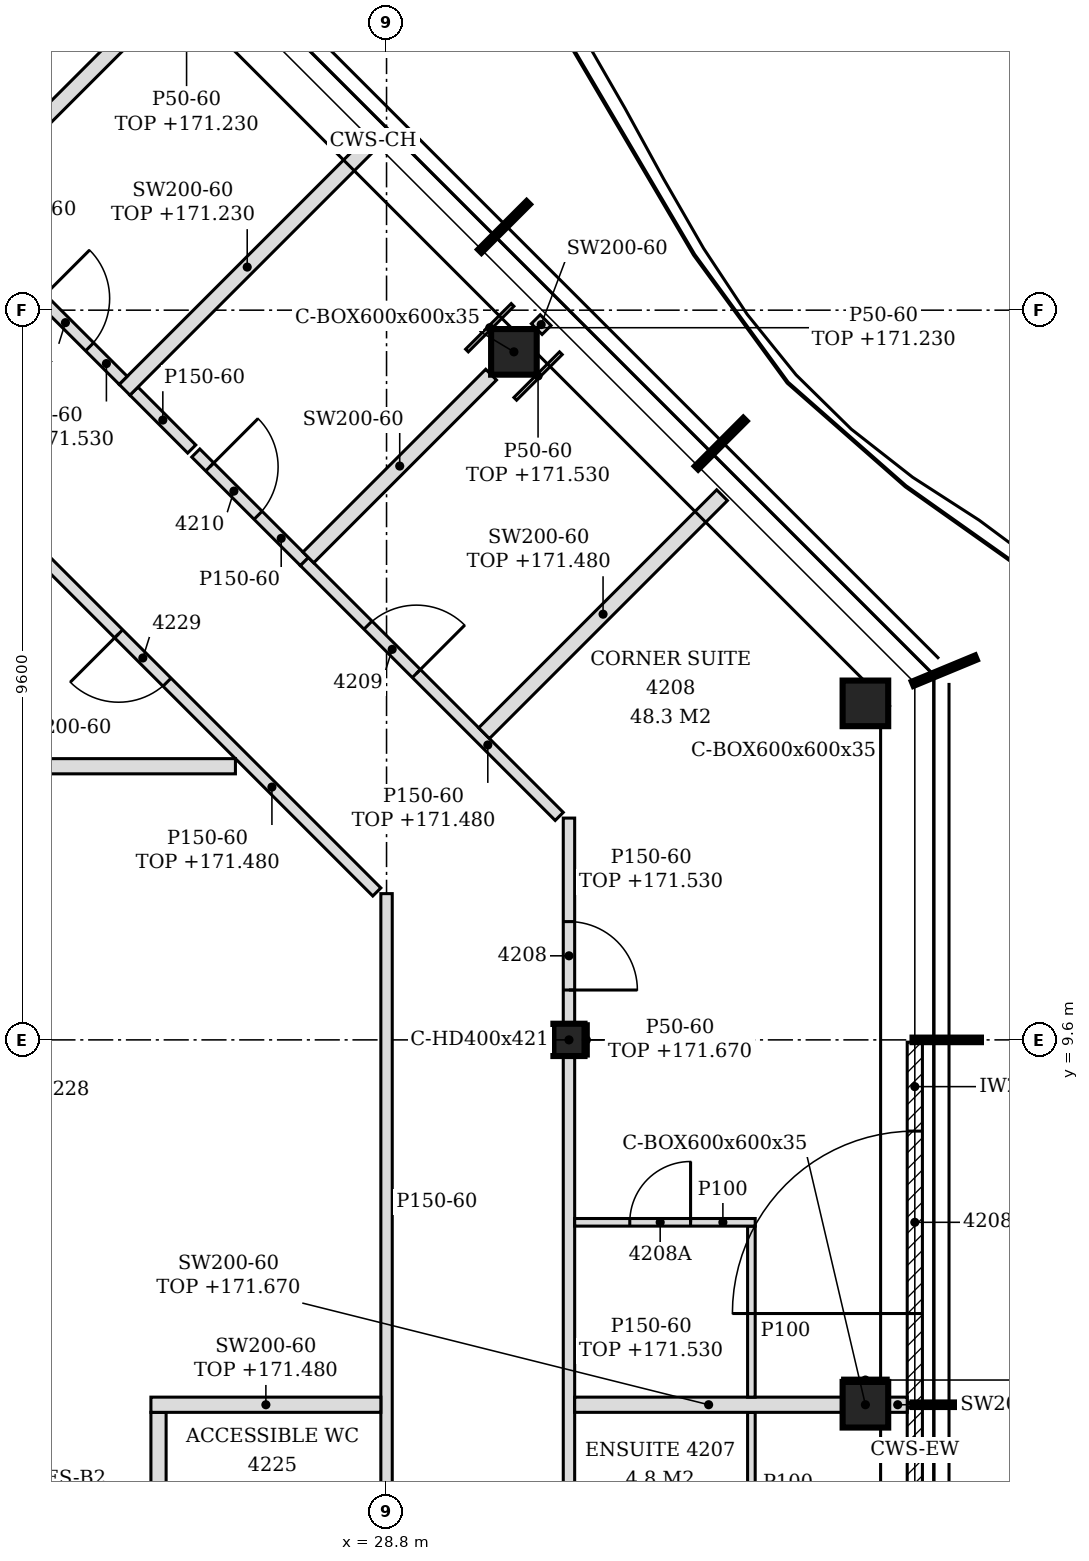
"""IFC4 building model, lengths in metres.
Left out: names, types, materials, properties, quantities, classifications, styles, units other than length and angle.
Written with IfcOpenShell. Run it as: python <this file> out.ifc"""

import sys

from ifc_helpers import new_model, si_unit, direction, frame, frame_2d, origin, origin_2d, place, context, subcontext, project, spatial, polyline, rectangle, hollow_rectangle, i_section, outline, extrude, clip, halfspace, element, fill, save


model = new_model("IFC4")
c1 = context("Model", 3, precision=1e-05, world=origin(), true_north=direction((0.0, 1.0)))
c2 = subcontext(c1, "Body", "Model", "MODEL_VIEW")
j1 = project(units=[si_unit("LENGTHUNIT", "METRE"), si_unit("PLANEANGLEUNIT", "RADIAN")], contexts=[c1])
p1 = place(None, origin())
s1 = spatial("IfcSite", under=j1, at=p1, CompositionType="ELEMENT")
p2 = place(p1, origin())
s2 = spatial("IfcBuilding", under=s1, at=p2, CompositionType="ELEMENT")
p3 = place(p2, frame((0.0, 0.0, 168.6)))
s3 = spatial("IfcBuildingStorey", under=s2, at=p3, CompositionType="ELEMENT", Elevation=168.6)
for number, where, z_axis, x_axis in (
    (1, (35.1, 4.8, -0.15), (0.0, 0.0, 1.0), (1.0, 0.0, 0.0)),
    (2, (35.1, 14.027, -0.15), (0.0, 0.0, 1.0), (1.0, 0.0, 0.0)),
    (3, (30.476, 18.652, -0.15), (0.0, 0.0, 1.0), (1.0, 0.0, 0.0)),
):
    element("IfcColumn", number, at=place(p3, frame(where, z_axis=z_axis, x_axis=x_axis)), inside=s3, PredefinedType="COLUMN", context=c2, shape_type="Clipping", body=[
        clip(extrude(hollow_rectangle(XDim=0.6, YDim=0.6, WallThickness=0.035, at=origin_2d()), origin(), (0.0, 0.0, 1.0), 3.6), halfspace(frame((0.0, 0.0, 3.589), z_axis=(0.0, 0.0, 1.0), x_axis=(1.0, 0.0, 0.0)), False)),
    ])
p4 = place(p3, frame((31.2, 9.6, -0.15), z_axis=(0.0, 0.0, 1.0), x_axis=(1.0, 0.0, 0.0)))
e4 = element("IfcColumn", 4, at=p4, inside=s3, PredefinedType="COLUMN", context=c2, shape_type="SweptSolid", body=[
    extrude(i_section(OverallWidth=0.409, OverallDepth=0.425, WebThickness=0.033, FlangeThickness=0.052, FilletRadius=0.015, at=origin_2d()), origin(), (0.0, 0.0, 1.0), 3.6),
])
p5 = place(p3, frame((35.75, 0.03, 0.0), z_axis=(0.0, 0.0, 1.0), x_axis=(0.0, 1.0, 0.0)))
e5 = element("IfcWall", 5, at=p5, inside=s3, PredefinedType="NOTDEFINED", context=c2, shape_type="SweptSolid", body=[
    extrude(rectangle(XDim=4.74, YDim=0.2, at=frame_2d((2.37, 0.0))), origin(), (0.0, 0.0, 1.0), 3.45),
])
p6 = place(p5, frame((1.17, 0.0, 0.0)))
e6 = element("IfcOpeningElement", 6, at=p6, cuts=e5, PredefinedType="OPENING", context=c2, shape_type="SweptSolid", body=[
    extrude(rectangle(XDim=2.4, YDim=2.4, at=frame_2d((1.2, 1.2))), frame((0.0, 0.11, 0.0), z_axis=(0.0, -1.0, 0.0), x_axis=(1.0, 0.0, 0.0)), (0.0, 0.0, 1.0), 0.22),
])
p7 = place(p3, frame((35.75, 4.83, 0.0), z_axis=(0.0, 0.0, 1.0), x_axis=(0.0, 1.0, 0.0)))
e7 = element("IfcWall", 7, at=p7, inside=s3, PredefinedType="NOTDEFINED", context=c2, shape_type="SweptSolid", body=[
    extrude(rectangle(XDim=4.74, YDim=0.2, at=frame_2d((2.37, 0.0))), origin(), (0.0, 0.0, 1.0), 3.45),
])
p8 = place(p7, frame((1.17, 0.0, 0.0)))
e8 = element("IfcOpeningElement", 8, at=p8, cuts=e7, PredefinedType="OPENING", context=c2, shape_type="SweptSolid", body=[
    extrude(rectangle(XDim=2.4, YDim=2.4, at=frame_2d((1.2, 1.2))), frame((0.0, 0.11, 0.0), z_axis=(0.0, -1.0, 0.0), x_axis=(1.0, 0.0, 0.0)), (0.0, 0.0, 1.0), 0.22),
])
p9 = place(p3, frame((31.2, 0.387, 0.0), z_axis=(0.0, 0.0, 1.0), x_axis=(0.0, 1.0, 0.0)))
e9 = element("IfcWall", 9, at=p9, inside=s3, PredefinedType="PARTITIONING", context=c2, shape_type="SweptSolid", body=[
    extrude(rectangle(XDim=9.0, YDim=0.15, at=frame_2d((4.5, 0.0))), origin(), (0.0, 0.0, 1.0), 2.93),
])
p10 = place(p9, frame((0.666, 0.0, 0.0)))
e10 = element("IfcOpeningElement", 10, at=p10, cuts=e9, PredefinedType="OPENING", context=c2, shape_type="SweptSolid", body=[
    extrude(rectangle(XDim=0.9, YDim=2.1, at=frame_2d((0.45, 1.05))), frame((0.0, 0.085, 0.0), z_axis=(0.0, -1.0, 0.0), x_axis=(1.0, 0.0, 0.0)), (0.0, 0.0, 1.0), 0.17),
])
p11 = place(p3, frame((25.8, 1.3, 0.0), z_axis=(0.0, 0.0, 1.0), x_axis=(0.0, 1.0, 0.0)))
e11 = element("IfcWall", 11, at=p11, inside=s3, PredefinedType="PARTITIONING", context=c2, shape_type="SweptSolid", body=[
    extrude(outline(polyline([(0.0, 0.0), (3.4, 0.0), (3.4, 2.88), (3.395, 2.88), (3.393, 3.45), (0.0, 3.45), (0.0, 0.0)])), frame((0.0, 0.1, 0.0), z_axis=(0.0, -1.0, 0.0), x_axis=(1.0, 0.0, 0.0)), (0.0, 0.0, 1.0), 0.2),
])
p12 = place(p3, frame((28.8, 1.3, 0.0), z_axis=(0.0, 0.0, 1.0), x_axis=(0.0, 1.0, 0.0)))
e12 = element("IfcWall", 12, at=p12, inside=s3, PredefinedType="PARTITIONING", context=c2, shape_type="SweptSolid", body=[
    extrude(outline(polyline([(0.0, 0.0), (10.224, 0.0), (10.224, 3.45), (8.405, 3.45), (8.403, 2.88), (8.195, 2.88), (8.193, 3.45), (3.605, 3.45), (3.603, 2.88), (3.395, 2.88), (3.393, 3.45), (0.0, 3.45), (0.0, 0.0)])), frame((0.0, 0.075, 0.0), z_axis=(0.0, -1.0, 0.0), x_axis=(1.0, 0.0, 0.0)), (0.0, 0.0, 1.0), 0.15),
])
p13 = place(p12, frame((1.3, 0.0, 0.0)))
e13 = element("IfcOpeningElement", 13, at=p13, cuts=e12, PredefinedType="OPENING", context=c2, shape_type="SweptSolid", body=[
    extrude(rectangle(XDim=0.8, YDim=2.1, at=frame_2d((0.4, 1.05))), frame((0.0, 0.085, 0.0), z_axis=(0.0, -1.0, 0.0), x_axis=(1.0, 0.0, 0.0)), (0.0, 0.0, 1.0), 0.17),
])
p14 = place(p3, frame((33.6, 2.85, 0.0), z_axis=(0.0, 0.0, 1.0), x_axis=(0.0, 1.0, 0.0)))
e14 = element("IfcWall", 14, at=p14, inside=s3, PredefinedType="PARTITIONING", context=c2, shape_type="SweptSolid", body=[
    extrude(rectangle(XDim=1.85, YDim=0.1, at=frame_2d((0.925, 0.0))), origin(), (0.0, 0.0, 1.0), 3.45),
])
p15 = place(p3, frame((25.7, 4.8, 0.0), z_axis=(0.0, 0.0, 1.0), x_axis=(1.0, 0.0, 0.0)))
e15 = element("IfcWall", 15, at=p15, inside=s3, PredefinedType="PARTITIONING", context=c2, shape_type="SweptSolid", body=[
    extrude(rectangle(XDim=3.025, YDim=0.2, at=frame_2d((1.513, 0.0))), origin(), (0.0, 0.0, 1.0), 2.88),
])
p16 = place(p3, frame((31.275, 4.8, 0.0), z_axis=(0.0, 0.0, 1.0), x_axis=(1.0, 0.0, 0.0)))
e16 = element("IfcWall", 16, at=p16, inside=s3, PredefinedType="PARTITIONING", context=c2, shape_type="SweptSolid", body=[
    extrude(outline(polyline([(0.0, 0.0), (3.525, 0.0), (3.525, 3.07), (0.075, 3.07), (0.073, 2.93), (0.0, 2.93), (0.0, 0.0)])), frame((0.0, 0.1, 0.0), z_axis=(0.0, -1.0, 0.0), x_axis=(1.0, 0.0, 0.0)), (0.0, 0.0, 1.0), 0.2),
])
p17 = place(p3, frame((35.4, 4.8, 0.0), z_axis=(0.0, 0.0, 1.0), x_axis=(1.0, 0.0, 0.0)))
e17 = element("IfcWall", 17, at=p17, inside=s3, PredefinedType="PARTITIONING", context=c2, shape_type="SweptSolid", body=[
    extrude(rectangle(XDim=0.25, YDim=0.2, at=frame_2d((0.125, 0.0))), origin(), (0.0, 0.0, 1.0), 3.45),
])
p18 = place(p3, frame((33.6, 4.9, 0.0), z_axis=(0.0, 0.0, 1.0), x_axis=(0.0, 1.0, 0.0)))
e18 = element("IfcWall", 18, at=p18, inside=s3, PredefinedType="PARTITIONING", context=c2, shape_type="SweptSolid", body=[
    extrude(rectangle(XDim=2.25, YDim=0.1, at=frame_2d((1.125, 0.0))), origin(), (0.0, 0.0, 1.0), 3.45),
])
p19 = place(p3, frame((31.275, 7.2, 0.0), z_axis=(0.0, 0.0, 1.0), x_axis=(1.0, 0.0, 0.0)))
e19 = element("IfcWall", 19, at=p19, inside=s3, PredefinedType="PARTITIONING", context=c2, shape_type="SweptSolid", body=[
    extrude(outline(polyline([(0.0, 0.0), (2.375, 0.0), (2.375, 3.45), (0.075, 3.45), (0.073, 2.93), (0.0, 2.93), (0.0, 0.0)])), frame((0.0, 0.05, 0.0), z_axis=(0.0, -1.0, 0.0), x_axis=(1.0, 0.0, 0.0)), (0.0, 0.0, 1.0), 0.1),
])
p20 = place(p19, frame((0.725, 0.0, 0.0)))
e20 = element("IfcOpeningElement", 20, at=p20, cuts=e19, PredefinedType="OPENING", context=c2, shape_type="SweptSolid", body=[
    extrude(rectangle(XDim=0.8, YDim=2.1, at=frame_2d((0.4, 1.05))), frame((0.0, 0.06, 0.0), z_axis=(0.0, -1.0, 0.0), x_axis=(1.0, 0.0, 0.0)), (0.0, 0.0, 1.0), 0.12),
])
p21 = place(p3, frame((31.2, 9.812, 0.0), z_axis=(0.0, 0.0, 1.0), x_axis=(0.0, 1.0, 0.0)))
e21 = element("IfcWall", 21, at=p21, inside=s3, PredefinedType="PARTITIONING", context=c2, shape_type="SweptSolid", body=[
    extrude(rectangle(XDim=2.706, YDim=0.15, at=frame_2d((1.353, 0.0))), origin(), (0.0, 0.0, 1.0), 2.93),
])
p22 = place(p21, frame((0.444, 0.0, 0.0)))
e22 = element("IfcOpeningElement", 22, at=p22, cuts=e21, PredefinedType="OPENING", context=c2, shape_type="SweptSolid", body=[
    extrude(rectangle(XDim=0.9, YDim=2.1, at=frame_2d((0.45, 1.05))), frame((0.0, 0.085, 0.0), z_axis=(0.0, -1.0, 0.0), x_axis=(1.0, 0.0, 0.0)), (0.0, 0.0, 1.0), 0.17),
])
p23 = place(p3, frame((28.672, 11.546, 0.0), z_axis=(0.0, 0.0, 1.0), x_axis=(-0.707106781187, 0.707106781187, 0.0)))
e23 = element("IfcWall", 23, at=p23, inside=s3, PredefinedType="PARTITIONING", context=c2, shape_type="SweptSolid", body=[
    extrude(rectangle(XDim=6.292, YDim=0.15, at=frame_2d((3.146, 0.0))), origin(), (0.0, 0.0, 1.0), 2.88),
])
p24 = place(p23, frame((3.903, 0.0, 0.0)))
e24 = element("IfcOpeningElement", 24, at=p24, cuts=e23, PredefinedType="OPENING", context=c2, shape_type="SweptSolid", body=[
    extrude(rectangle(XDim=0.9, YDim=2.1, at=frame_2d((0.45, 1.05))), frame((0.0, 0.085, 0.0), z_axis=(0.0, -1.0, 0.0), x_axis=(1.0, 0.0, 0.0)), (0.0, 0.0, 1.0), 0.17),
])
p25 = place(p3, frame((31.072, 12.54, 0.0), z_axis=(0.0, 0.0, 1.0), x_axis=(-0.707106781187, 0.707106781187, 0.0)))
e25 = element("IfcWall", 25, at=p25, inside=s3, PredefinedType="PARTITIONING", context=c2, shape_type="SweptSolid", body=[
    extrude(rectangle(XDim=4.743, YDim=0.15, at=frame_2d((2.372, 0.0))), origin(), (0.0, 0.0, 1.0), 2.88),
])
p26 = place(p25, frame((2.658, 0.0, 0.0)))
e26 = element("IfcOpeningElement", 26, at=p26, cuts=e25, PredefinedType="OPENING", context=c2, shape_type="SweptSolid", body=[
    extrude(rectangle(XDim=0.9, YDim=2.1, at=frame_2d((0.45, 1.05))), frame((0.0, 0.085, 0.0), z_axis=(0.0, -1.0, 0.0), x_axis=(1.0, 0.0, 0.0)), (0.0, 0.0, 1.0), 0.17),
])
p27 = place(p3, frame((21.205, 13.2, 0.0), z_axis=(0.0, 0.0, 1.0), x_axis=(1.0, 0.0, 0.0)))
e27 = element("IfcWall", 27, at=p27, inside=s3, PredefinedType="PARTITIONING", context=c2, shape_type="SweptSolid", body=[
    extrude(rectangle(XDim=5.607, YDim=0.2, at=frame_2d((2.804, 0.0))), origin(), (0.0, 0.0, 1.0), 3.45),
])
p28 = place(p3, frame((30.083, 13.635, 0.0), z_axis=(0.0, 0.0, 1.0), x_axis=(0.707106781187, 0.707106781187, 0.0)))
e28 = element("IfcWall", 28, at=p28, inside=s3, PredefinedType="PARTITIONING", context=c2, shape_type="SweptSolid", body=[
    extrude(rectangle(XDim=4.428, YDim=0.2, at=frame_2d((2.214, 0.0))), origin(), (0.0, 0.0, 1.0), 2.88),
])
p29 = place(p3, frame((27.718, 15.894, 0.0), z_axis=(0.0, 0.0, 1.0), x_axis=(-0.707348651109, 0.706864828503, 0.0)))
e29 = element("IfcWall", 29, at=p29, inside=s3, PredefinedType="PARTITIONING", context=c2, shape_type="SweptSolid", body=[
    extrude(rectangle(XDim=2.018, YDim=0.15, at=frame_2d((1.009, 0.0))), origin(), (0.0, 0.0, 1.0), 3.45),
])
p30 = place(p29, frame((0.859, 0.0, 0.0)))
e30 = element("IfcOpeningElement", 30, at=p30, cuts=e29, PredefinedType="OPENING", context=c2, shape_type="SweptSolid", body=[
    extrude(rectangle(XDim=0.9, YDim=2.1, at=frame_2d((0.45, 1.05))), frame((0.0, 0.085, 0.0), z_axis=(0.0, -1.0, 0.0), x_axis=(1.0, 0.0, 0.0)), (0.0, 0.0, 1.0), 0.17),
])
p31 = place(p3, frame((27.771, 15.947, 0.0), z_axis=(0.0, 0.0, 1.0), x_axis=(0.707106781187, 0.707106781187, 0.0)))
e31 = element("IfcWall", 31, at=p31, inside=s3, PredefinedType="PARTITIONING", context=c2, shape_type="SweptSolid", body=[
    extrude(rectangle(XDim=3.401, YDim=0.2, at=frame_2d((1.7, 0.0))), origin(), (0.0, 0.0, 1.0), 3.45),
])
p32 = place(p3, frame((26.237, 17.373, 0.0), z_axis=(0.0, 0.0, 1.0), x_axis=(-0.706198780021, 0.708013617875, 0.0)))
e32 = element("IfcWall", 32, at=p32, inside=s3, PredefinedType="PARTITIONING", context=c2, shape_type="SweptSolid", body=[
    extrude(rectangle(XDim=1.076, YDim=0.15, at=frame_2d((0.538, 0.0))), origin(), (0.0, 0.0, 1.0), 3.45),
])
p33 = place(p3, frame((25.353, 18.153, 0.0), z_axis=(0.0, 0.0, 1.0), x_axis=(0.707106781187, 0.707106781187, 0.0)))
e33 = element("IfcWall", 33, at=p33, inside=s3, PredefinedType="PARTITIONING", context=c2, shape_type="SweptSolid", body=[
    extrude(rectangle(XDim=4.565, YDim=0.2, at=frame_2d((2.282, 0.0))), origin(), (0.0, 0.0, 1.0), 2.63),
])
p34 = place(p3, frame((25.335, 18.277, 0.0), z_axis=(0.0, 0.0, 1.0), x_axis=(-0.707254881879, 0.706958649468, 0.0)))
e34 = element("IfcWall", 34, at=p34, inside=s3, PredefinedType="PARTITIONING", context=c2, shape_type="SweptSolid", body=[
    extrude(rectangle(XDim=1.648, YDim=0.15, at=frame_2d((0.824, 0.0))), origin(), (0.0, 0.0, 1.0), 2.93),
])
p35 = place(p34, frame((0.624, 0.0, 0.0)))
e35 = element("IfcOpeningElement", 35, at=p35, cuts=e34, PredefinedType="OPENING", context=c2, shape_type="SweptSolid", body=[
    extrude(rectangle(XDim=0.9, YDim=2.1, at=frame_2d((0.45, 1.05))), frame((0.0, 0.085, 0.0), z_axis=(0.0, -1.0, 0.0), x_axis=(1.0, 0.0, 0.0)), (0.0, 0.0, 1.0), 0.17),
])
p36 = place(p3, frame((30.776, 18.952, 0.0), z_axis=(0.0, 0.0, 1.0), x_axis=(0.707106781187, 0.707106781187, 0.0)))
e36 = element("IfcWall", 36, at=p36, inside=s3, PredefinedType="PARTITIONING", context=c2, shape_type="SweptSolid", body=[
    extrude(rectangle(XDim=0.166, YDim=0.2, at=frame_2d((0.083, 0.0))), origin(), (0.0, 0.0, 1.0), 3.45),
])
p37 = place(p3, frame((23.041, 20.465, 0.0), z_axis=(0.0, 0.0, 1.0), x_axis=(0.707106781187, 0.707106781187, 0.0)))
e37 = element("IfcWall", 37, at=p37, inside=s3, PredefinedType="PARTITIONING", context=c2, shape_type="SweptSolid", body=[
    extrude(rectangle(XDim=3.55, YDim=0.2, at=frame_2d((1.775, 0.0))), origin(), (0.0, 0.0, 1.0), 3.45),
])
p38 = place(p3, frame((31.429, 9.387, 0.0), z_axis=(0.0, 0.0, 1.0), x_axis=(0.0, 1.0, 0.0)))
e38 = element("IfcWall", 38, at=p38, inside=s3, PredefinedType="PARTITIONING", context=c2, shape_type="SweptSolid", body=[
    extrude(rectangle(XDim=0.425, YDim=0.05, at=frame_2d((0.212, 0.0))), origin(), (0.0, 0.0, 1.0), 3.07),
])
p39 = place(p3, frame((34.8, 5.125, 0.0), z_axis=(0.0, 0.0, 1.0), x_axis=(1.0, 0.0, 0.0)))
e39 = element("IfcWall", 39, at=p39, inside=s3, PredefinedType="PARTITIONING", context=c2, shape_type="SweptSolid", body=[
    extrude(rectangle(XDim=0.6, YDim=0.05, at=frame_2d((0.3, 0.0))), origin(), (0.0, 0.0, 1.0), 2.93),
])
p40 = place(p3, frame((29.858, 18.669, 0.0), z_axis=(0.0, 0.0, 1.0), x_axis=(0.707106781187, 0.707106781187, 0.0)))
e40 = element("IfcWall", 40, at=p40, inside=s3, PredefinedType="PARTITIONING", context=c2, shape_type="SweptSolid", body=[
    extrude(rectangle(XDim=0.849, YDim=0.05, at=frame_2d((0.424, 0.0))), origin(), (0.0, 0.0, 1.0), 2.63),
])
p41 = place(p3, frame((30.493, 18.034, 0.0), z_axis=(0.0, 0.0, 1.0), x_axis=(0.707106781187, 0.707106781187, 0.0)))
e41 = element("IfcWall", 41, at=p41, inside=s3, PredefinedType="PARTITIONING", context=c2, shape_type="SweptSolid", body=[
    extrude(rectangle(XDim=0.849, YDim=0.05, at=frame_2d((0.424, 0.0))), origin(), (0.0, 0.0, 1.0), 2.93),
])
p42 = place(p8, origin())
e42 = element("IfcDoor", 42, at=p42, inside=s3, OperationType="SINGLE_SWING_LEFT", PredefinedType="DOOR", context=c2, shape_type="SweptSolid", body=[
    extrude(rectangle(XDim=2.4, YDim=2.4, at=frame_2d((1.2, 1.2))), frame((0.0, 0.025, 0.0), z_axis=(0.0, -1.0, 0.0), x_axis=(1.0, 0.0, 0.0)), (0.0, 0.0, 1.0), 0.05),
])
fill(e8, e42)
p43 = place(p22, frame((0.9, 0.0, 0.0), z_axis=(0.0, 0.0, 1.0), x_axis=(-1.0, 0.0, 0.0)))
e43 = element("IfcDoor", 43, at=p43, inside=s3, OperationType="SINGLE_SWING_RIGHT", PredefinedType="DOOR", context=c2, shape_type="SweptSolid", body=[
    extrude(rectangle(XDim=0.9, YDim=2.1, at=frame_2d((0.45, 1.05))), frame((0.0, 0.025, 0.0), z_axis=(0.0, -1.0, 0.0), x_axis=(1.0, 0.0, 0.0)), (0.0, 0.0, 1.0), 0.05),
])
fill(e22, e43)
p44 = place(p20, origin())
e44 = element("IfcDoor", 44, at=p44, inside=s3, OperationType="SINGLE_SWING_RIGHT", PredefinedType="DOOR", context=c2, shape_type="SweptSolid", body=[
    extrude(rectangle(XDim=0.8, YDim=2.1, at=frame_2d((0.4, 1.05))), frame((0.0, 0.025, 0.0), z_axis=(0.0, -1.0, 0.0), x_axis=(1.0, 0.0, 0.0)), (0.0, 0.0, 1.0), 0.05),
])
fill(e20, e44)
p45 = place(p26, frame((0.9, 0.0, 0.0), z_axis=(0.0, 0.0, 1.0), x_axis=(-1.0, 0.0, 0.0)))
e45 = element("IfcDoor", 45, at=p45, inside=s3, OperationType="SINGLE_SWING_RIGHT", PredefinedType="DOOR", context=c2, shape_type="SweptSolid", body=[
    extrude(rectangle(XDim=0.9, YDim=2.1, at=frame_2d((0.45, 1.05))), frame((0.0, 0.025, 0.0), z_axis=(0.0, -1.0, 0.0), x_axis=(1.0, 0.0, 0.0)), (0.0, 0.0, 1.0), 0.05),
])
fill(e26, e45)
p46 = place(p30, frame((0.9, 0.0, 0.0), z_axis=(0.0, 0.0, 1.0), x_axis=(-1.0, 0.0, 0.0)))
e46 = element("IfcDoor", 46, at=p46, inside=s3, OperationType="SINGLE_SWING_LEFT", PredefinedType="DOOR", context=c2, shape_type="SweptSolid", body=[
    extrude(rectangle(XDim=0.9, YDim=2.1, at=frame_2d((0.45, 1.05))), frame((0.0, 0.025, 0.0), z_axis=(0.0, -1.0, 0.0), x_axis=(1.0, 0.0, 0.0)), (0.0, 0.0, 1.0), 0.05),
])
fill(e30, e46)
p47 = place(p35, frame((0.9, 0.0, 0.0), z_axis=(0.0, 0.0, 1.0), x_axis=(-1.0, 0.0, 0.0)))
e47 = element("IfcDoor", 47, at=p47, inside=s3, OperationType="SINGLE_SWING_LEFT", PredefinedType="DOOR", context=c2, shape_type="SweptSolid", body=[
    extrude(rectangle(XDim=0.9, YDim=2.1, at=frame_2d((0.45, 1.05))), frame((0.0, 0.025, 0.0), z_axis=(0.0, -1.0, 0.0), x_axis=(1.0, 0.0, 0.0)), (0.0, 0.0, 1.0), 0.05),
])
fill(e35, e47)
p48 = place(p24, origin())
e48 = element("IfcDoor", 48, at=p48, inside=s3, OperationType="SINGLE_SWING_RIGHT", PredefinedType="DOOR", context=c2, shape_type="SweptSolid", body=[
    extrude(rectangle(XDim=0.9, YDim=2.1, at=frame_2d((0.45, 1.05))), frame((0.0, 0.025, 0.0), z_axis=(0.0, -1.0, 0.0), x_axis=(1.0, 0.0, 0.0)), (0.0, 0.0, 1.0), 0.05),
])
fill(e24, e48)
save(model, sys.argv[1])
